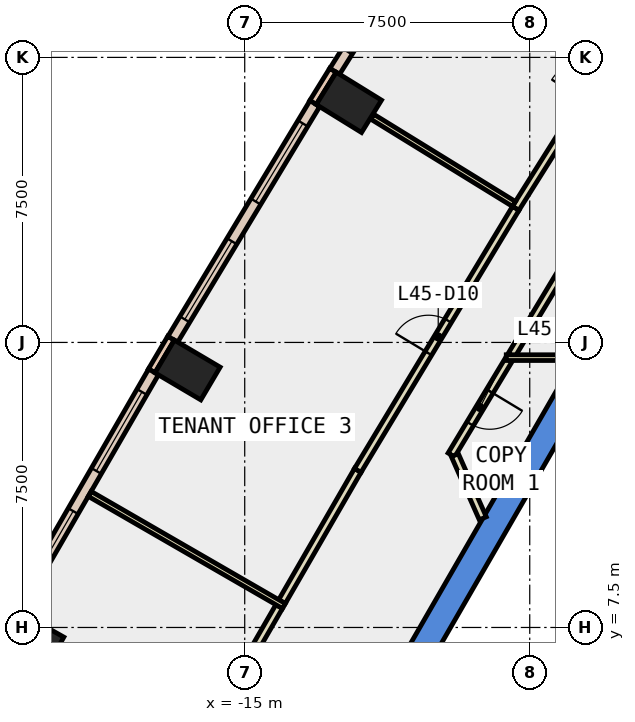
"""IFC4 building model, lengths in metres.
Left out: names, types, materials, properties, quantities, classifications, styles, units other than length and angle.
Written with IfcOpenShell. Run it as: python <this file> out.ifc"""

import sys

from ifc_helpers import new_model, si_unit, direction, frame, frame_2d, origin, origin_2d, place, context, subcontext, project, spatial, polyline, rectangle, outline, extrude, element, fill, save


model = new_model("IFC4")
c1 = context("Model", 3, precision=1e-05, world=origin(), true_north=direction((0.0, 1.0)))
c2 = subcontext(c1, "Body", "Model", "MODEL_VIEW")
j1 = project(units=[si_unit("LENGTHUNIT", "METRE"), si_unit("PLANEANGLEUNIT", "RADIAN")], contexts=[c1])
p1 = place(None, origin())
s1 = spatial("IfcSite", under=j1, at=p1, CompositionType="ELEMENT")
p2 = place(p1, origin())
s2 = spatial("IfcBuilding", under=s1, at=p2, CompositionType="ELEMENT")
p3 = place(p2, frame((0.0, 0.0, 202.4)))
s3 = spatial("IfcBuildingStorey", under=s2, at=p3, CompositionType="ELEMENT", Elevation=202.4)
for number, where, z_axis, x_axis in (
    (1, (-12.259, 21.317, -0.4), (0.0, 0.0, 1.0), (0.525, 0.851, 0.0)),
    (2, (-16.504, 14.275, -0.4), (0.0, 0.0, 1.0), (0.509, 0.861, 0.0)),
    (3, (-20.615, 7.155, -0.4), (0.0, 0.0, 1.0), (0.491, 0.871, 0.0)),
):
    element("IfcColumn", number, at=place(p3, frame(where, z_axis=z_axis, x_axis=x_axis)), inside=s3, PredefinedType="COLUMN", context=c2, shape_type="SweptSolid", body=[
        extrude(rectangle(XDim=1.0, YDim=1.4, at=origin_2d()), origin(), (0.0, 0.0, 1.0), 4.2),
    ])
p4 = place(p3, frame((0.0, 0.0, -0.4)))
e4 = element("IfcWall", 4, at=p4, inside=s3, PredefinedType="SHEAR", context=c2, shape_type="SweptSolid", body=[
    extrude(outline(polyline([(-11.834, 5.002), (-11.228, 4.652), (-6.235, 13.3), (-6.64, 14.0), (-11.834, 5.002)])), origin(), (0.0, 0.0, 1.0), 4.2),
])
p5 = place(p3, frame((-12.677, 22.163, 0.0), z_axis=(0.0, 0.0, 1.0), x_axis=(-0.525648735675, -0.850701714282, 0.0)))
e5 = element("IfcWall", 5, at=p5, inside=s3, PredefinedType="STANDARD", context=c2, shape_type="SweptSolid", body=[
    extrude(rectangle(XDim=1.0, YDim=0.2, at=frame_2d((0.5, 0.0))), origin(), (0.0, 0.0, 1.0), 3.8),
])
p6 = place(p3, frame((-16.939, 15.113, 0.0), z_axis=(0.0, 0.0, 1.0), x_axis=(-0.508161541526, -0.861261776531, 0.0)))
e6 = element("IfcWall", 6, at=p6, inside=s3, PredefinedType="STANDARD", context=c2, shape_type="SweptSolid", body=[
    extrude(rectangle(XDim=1.0, YDim=0.2, at=frame_2d((0.5, 0.0))), origin(), (0.0, 0.0, 1.0), 3.8),
])
p7 = place(p3, frame((-8.759, 28.29, 0.0), z_axis=(0.0, 0.0, 1.0), x_axis=(-0.532522107002, -0.84641609481, 0.0)))
e7 = element("IfcWall", 7, at=p7, inside=s3, PredefinedType="STANDARD", context=c2, shape_type="SweptSolid", body=[
    extrude(rectangle(XDim=7.273, YDim=0.3, at=frame_2d((3.636, 0.0))), origin(), (0.0, 0.0, 1.0), 3.8),
])
p8 = place(p7, frame((0.618, 0.0, 0.9)))
e8 = element("IfcOpeningElement", 8, at=p8, cuts=e7, PredefinedType="OPENING", context=c2, shape_type="SweptSolid", body=[
    extrude(rectangle(XDim=2.4, YDim=2.6, at=frame_2d((1.2, 1.3))), frame((0.0, 0.16, 0.0), z_axis=(0.0, -1.0, 0.0), x_axis=(1.0, 0.0, 0.0)), (0.0, 0.0, 1.0), 0.32),
])
p9 = place(p7, frame((4.255, 0.0, 0.9)))
e9 = element("IfcOpeningElement", 9, at=p9, cuts=e7, PredefinedType="OPENING", context=c2, shape_type="SweptSolid", body=[
    extrude(rectangle(XDim=2.4, YDim=2.6, at=frame_2d((1.2, 1.3))), frame((0.0, 0.16, 0.0), z_axis=(0.0, -1.0, 0.0), x_axis=(1.0, 0.0, 0.0)), (0.0, 0.0, 1.0), 0.32),
])
p10 = place(p3, frame((-13.155, 21.284, 0.0), z_axis=(0.0, 0.0, 1.0), x_axis=(-0.516230553484, -0.856449657394, 0.0)))
e10 = element("IfcWall", 10, at=p10, inside=s3, PredefinedType="STANDARD", context=c2, shape_type="SweptSolid", body=[
    extrude(rectangle(XDim=7.239, YDim=0.3, at=frame_2d((3.62, 0.0))), origin(), (0.0, 0.0, 1.0), 3.8),
])
p11 = place(p10, frame((0.61, 0.0, 0.9)))
e11 = element("IfcOpeningElement", 11, at=p11, cuts=e10, PredefinedType="OPENING", context=c2, shape_type="SweptSolid", body=[
    extrude(rectangle(XDim=2.4, YDim=2.6, at=frame_2d((1.2, 1.3))), frame((0.0, 0.16, 0.0), z_axis=(0.0, -1.0, 0.0), x_axis=(1.0, 0.0, 0.0)), (0.0, 0.0, 1.0), 0.32),
])
p12 = place(p10, frame((4.229, 0.0, 0.9)))
e12 = element("IfcOpeningElement", 12, at=p12, cuts=e10, PredefinedType="OPENING", context=c2, shape_type="SweptSolid", body=[
    extrude(rectangle(XDim=2.4, YDim=2.6, at=frame_2d((1.2, 1.3))), frame((0.0, 0.16, 0.0), z_axis=(0.0, -1.0, 0.0), x_axis=(1.0, 0.0, 0.0)), (0.0, 0.0, 1.0), 0.32),
])
p13 = place(p3, frame((-17.399, 14.225, 0.0), z_axis=(0.0, 0.0, 1.0), x_axis=(-0.500012402131, -0.866018243292, 0.0)))
e13 = element("IfcWall", 13, at=p13, inside=s3, PredefinedType="STANDARD", context=c2, shape_type="SweptSolid", body=[
    extrude(rectangle(XDim=7.24, YDim=0.3, at=frame_2d((3.62, 0.0))), origin(), (0.0, 0.0, 1.0), 3.8),
])
p14 = place(p13, frame((0.61, 0.0, 0.9)))
e14 = element("IfcOpeningElement", 14, at=p14, cuts=e13, PredefinedType="OPENING", context=c2, shape_type="SweptSolid", body=[
    extrude(rectangle(XDim=2.4, YDim=2.6, at=frame_2d((1.2, 1.3))), frame((0.0, 0.16, 0.0), z_axis=(0.0, -1.0, 0.0), x_axis=(1.0, 0.0, 0.0)), (0.0, 0.0, 1.0), 0.32),
])
p15 = place(p13, frame((4.23, 0.0, 0.9)))
e15 = element("IfcOpeningElement", 15, at=p15, cuts=e13, PredefinedType="OPENING", context=c2, shape_type="SweptSolid", body=[
    extrude(rectangle(XDim=2.4, YDim=2.6, at=frame_2d((1.2, 1.3))), frame((0.0, 0.16, 0.0), z_axis=(0.0, -1.0, 0.0), x_axis=(1.0, 0.0, 0.0)), (0.0, 0.0, 1.0), 0.32),
])
p16 = place(p3, frame((-8.057, 14.536, 0.0), z_axis=(0.0, 0.0, 1.0), x_axis=(-0.516268010323, -0.856427078926, 0.0)))
e16 = element("IfcWall", 16, at=p16, inside=s3, PredefinedType="PARTITIONING", context=c2, shape_type="SweptSolid", body=[
    extrude(rectangle(XDim=2.915, YDim=0.2, at=frame_2d((1.458, 0.0))), origin(), (0.0, 0.0, 1.0), 3.8),
])
p17 = place(p16, frame((0.958, 0.0, 0.0)))
e17 = element("IfcOpeningElement", 17, at=p17, cuts=e16, PredefinedType="OPENING", context=c2, shape_type="SweptSolid", body=[
    extrude(rectangle(XDim=1.0, YDim=2.1, at=frame_2d((0.5, 1.05))), frame((0.0, 0.11, 0.0), z_axis=(0.0, -1.0, 0.0), x_axis=(1.0, 0.0, 0.0)), (0.0, 0.0, 1.0), 0.22),
])
p18 = place(p3, frame((-9.47, 12.033, 0.0), z_axis=(0.0, 0.0, 1.0), x_axis=(0.40441741061, -0.914574522931, 0.0)))
e18 = element("IfcWall", 18, at=p18, inside=s3, PredefinedType="PARTITIONING", context=c2, shape_type="SweptSolid", body=[
    extrude(rectangle(XDim=1.817, YDim=0.2, at=frame_2d((0.909, 0.0))), origin(), (0.0, 0.0, 1.0), 3.8),
])
p19 = place(p3, frame((-6.213, 17.595, 0.0), z_axis=(0.0, 0.0, 1.0), x_axis=(-0.516121112316, -0.856515614231, 0.0)))
e19 = element("IfcWall", 19, at=p19, inside=s3, PredefinedType="PARTITIONING", context=c2, shape_type="SweptSolid", body=[
    extrude(rectangle(XDim=3.422, YDim=0.2, at=frame_2d((1.711, 0.0))), origin(), (0.0, 0.0, 1.0), 3.8),
])
p20 = place(p3, frame((-7.871, 18.528, 0.0), z_axis=(0.0, 0.0, 1.0), x_axis=(0.532587642146, 0.846374859878, 0.0)))
e20 = element("IfcWall", 20, at=p20, inside=s3, PredefinedType="PARTITIONING", context=c2, shape_type="SweptSolid", body=[
    extrude(rectangle(XDim=7.749, YDim=0.2, at=frame_2d((3.875, 0.0))), origin(), (0.0, 0.0, 1.0), 3.8),
])
p21 = place(p20, frame((3.375, 0.0, 0.0)))
e21 = element("IfcOpeningElement", 21, at=p21, cuts=e20, PredefinedType="OPENING", context=c2, shape_type="SweptSolid", body=[
    extrude(rectangle(XDim=1.0, YDim=2.1, at=frame_2d((0.5, 1.05))), frame((0.0, 0.11, 0.0), z_axis=(0.0, -1.0, 0.0), x_axis=(1.0, 0.0, 0.0)), (0.0, 0.0, 1.0), 0.22),
])
p22 = place(p3, frame((-14.019, 8.18, 0.0), z_axis=(0.0, 0.0, 1.0), x_axis=(0.500089897431, 0.865973495257, 0.0)))
e22 = element("IfcWall", 22, at=p22, inside=s3, PredefinedType="PARTITIONING", context=c2, shape_type="SweptSolid", body=[
    extrude(rectangle(XDim=3.988, YDim=0.2, at=frame_2d((1.994, 0.0))), origin(), (0.0, 0.0, 1.0), 3.8),
])
p23 = place(p3, frame((-12.025, 11.633, 0.0), z_axis=(0.0, 0.0, 1.0), x_axis=(0.516283129542, 0.856417964636, 0.0)))
e23 = element("IfcWall", 23, at=p23, inside=s3, PredefinedType="PARTITIONING", context=c2, shape_type="SweptSolid", body=[
    extrude(rectangle(XDim=8.05, YDim=0.2, at=frame_2d((4.025, 0.0))), origin(), (0.0, 0.0, 1.0), 3.8),
])
p24 = place(p23, frame((3.6, 0.0, 0.0)))
e24 = element("IfcOpeningElement", 24, at=p24, cuts=e23, PredefinedType="OPENING", context=c2, shape_type="SweptSolid", body=[
    extrude(rectangle(XDim=1.0, YDim=2.1, at=frame_2d((0.5, 1.05))), frame((0.0, 0.11, 0.0), z_axis=(0.0, -1.0, 0.0), x_axis=(1.0, 0.0, 0.0)), (0.0, 0.0, 1.0), 0.22),
])
p25 = place(p3, frame((-16.087, 4.597, 0.0), z_axis=(0.0, 0.0, 1.0), x_axis=(0.499860276602, 0.866106058099, 0.0)))
e25 = element("IfcWall", 25, at=p25, inside=s3, PredefinedType="PARTITIONING", context=c2, shape_type="SweptSolid", body=[
    extrude(rectangle(XDim=3.987, YDim=0.2, at=frame_2d((1.994, 0.0))), origin(), (0.0, 0.0, 1.0), 3.8),
])
p26 = place(p25, frame((1.494, 0.0, 0.0)))
e26 = element("IfcOpeningElement", 26, at=p26, cuts=e25, PredefinedType="OPENING", context=c2, shape_type="SweptSolid", body=[
    extrude(rectangle(XDim=1.0, YDim=2.1, at=frame_2d((0.5, 1.05))), frame((0.0, 0.11, 0.0), z_axis=(0.0, -1.0, 0.0), x_axis=(1.0, 0.0, 0.0)), (0.0, 0.0, 1.0), 0.22),
])
p27 = place(p3, frame((-4.316, 14.6, 0.0), z_axis=(0.0, 0.0, 1.0), x_axis=(-1.0, 0.0, 0.0)))
e27 = element("IfcWall", 27, at=p27, inside=s3, PredefinedType="PARTITIONING", context=c2, shape_type="SweptSolid", body=[
    extrude(rectangle(XDim=3.802, YDim=0.15, at=frame_2d((1.901, 0.0))), origin(), (0.0, 0.0, 1.0), 3.8),
])
p28 = place(p3, frame((-7.916, 18.644, 0.0), z_axis=(0.0, 0.0, 1.0), x_axis=(-0.851543444049, 0.524284047914, 0.0)))
e28 = element("IfcWall", 28, at=p28, inside=s3, PredefinedType="PARTITIONING", context=c2, shape_type="SweptSolid", body=[
    extrude(rectangle(XDim=4.379, YDim=0.15, at=frame_2d((2.189, 0.0))), origin(), (0.0, 0.0, 1.0), 3.8),
])
p29 = place(p3, frame((-13.97, 8.065, 0.0), z_axis=(0.0, 0.0, 1.0), x_axis=(-0.866011230889, 0.500024547371, 0.0)))
e29 = element("IfcWall", 29, at=p29, inside=s3, PredefinedType="PARTITIONING", context=c2, shape_type="SweptSolid", body=[
    extrude(rectangle(XDim=5.9, YDim=0.15, at=frame_2d((2.95, 0.0))), origin(), (0.0, 0.0, 1.0), 3.8),
])
p30 = place(p3, frame((-5.03, 9.388, 0.0), z_axis=(0.0, 0.0, 1.0), x_axis=(-0.499978703459, -0.866037698999, 0.0)))
e30 = element("IfcWall", 30, at=p30, inside=s3, PredefinedType="STANDARD", context=c2, shape_type="SweptSolid", body=[
    extrude(rectangle(XDim=6.9, YDim=0.2, at=frame_2d((3.45, 0.0))), origin(), (0.0, 0.0, 1.0), 3.8),
])
p31 = place(p11, origin())
e31 = element("IfcWindow", 31, at=p31, inside=s3, PartitioningType="SINGLE_PANEL", PredefinedType="WINDOW", context=c2, shape_type="SweptSolid", body=[
    extrude(rectangle(XDim=2.4, YDim=2.6, at=frame_2d((1.2, 1.3))), frame((0.0, 0.03, 0.0), z_axis=(0.0, -1.0, 0.0), x_axis=(1.0, 0.0, 0.0)), (0.0, 0.0, 1.0), 0.06),
])
fill(e11, e31)
p32 = place(p12, origin())
e32 = element("IfcWindow", 32, at=p32, inside=s3, PartitioningType="SINGLE_PANEL", PredefinedType="WINDOW", context=c2, shape_type="SweptSolid", body=[
    extrude(rectangle(XDim=2.4, YDim=2.6, at=frame_2d((1.2, 1.3))), frame((0.0, 0.03, 0.0), z_axis=(0.0, -1.0, 0.0), x_axis=(1.0, 0.0, 0.0)), (0.0, 0.0, 1.0), 0.06),
])
fill(e12, e32)
p33 = place(p14, origin())
e33 = element("IfcWindow", 33, at=p33, inside=s3, PartitioningType="SINGLE_PANEL", PredefinedType="WINDOW", context=c2, shape_type="SweptSolid", body=[
    extrude(rectangle(XDim=2.4, YDim=2.6, at=frame_2d((1.2, 1.3))), frame((0.0, 0.03, 0.0), z_axis=(0.0, -1.0, 0.0), x_axis=(1.0, 0.0, 0.0)), (0.0, 0.0, 1.0), 0.06),
])
fill(e14, e33)
p34 = place(p15, origin())
e34 = element("IfcWindow", 34, at=p34, inside=s3, PartitioningType="SINGLE_PANEL", PredefinedType="WINDOW", context=c2, shape_type="SweptSolid", body=[
    extrude(rectangle(XDim=2.4, YDim=2.6, at=frame_2d((1.2, 1.3))), frame((0.0, 0.03, 0.0), z_axis=(0.0, -1.0, 0.0), x_axis=(1.0, 0.0, 0.0)), (0.0, 0.0, 1.0), 0.06),
])
fill(e15, e34)
p35 = place(p24, origin())
e35 = element("IfcDoor", 35, at=p35, inside=s3, OperationType="SINGLE_SWING_LEFT", PredefinedType="DOOR", context=c2, shape_type="SweptSolid", body=[
    extrude(rectangle(XDim=1.0, YDim=2.1, at=frame_2d((0.5, 1.05))), frame((0.0, 0.025, 0.0), z_axis=(0.0, -1.0, 0.0), x_axis=(1.0, 0.0, 0.0)), (0.0, 0.0, 1.0), 0.05),
])
fill(e24, e35)
p36 = place(p17, origin())
e36 = element("IfcDoor", 36, at=p36, inside=s3, OperationType="SINGLE_SWING_LEFT", PredefinedType="DOOR", context=c2, shape_type="SweptSolid", body=[
    extrude(rectangle(XDim=1.0, YDim=2.1, at=frame_2d((0.5, 1.05))), frame((0.0, 0.025, 0.0), z_axis=(0.0, -1.0, 0.0), x_axis=(1.0, 0.0, 0.0)), (0.0, 0.0, 1.0), 0.05),
])
fill(e17, e36)
save(model, sys.argv[1])
